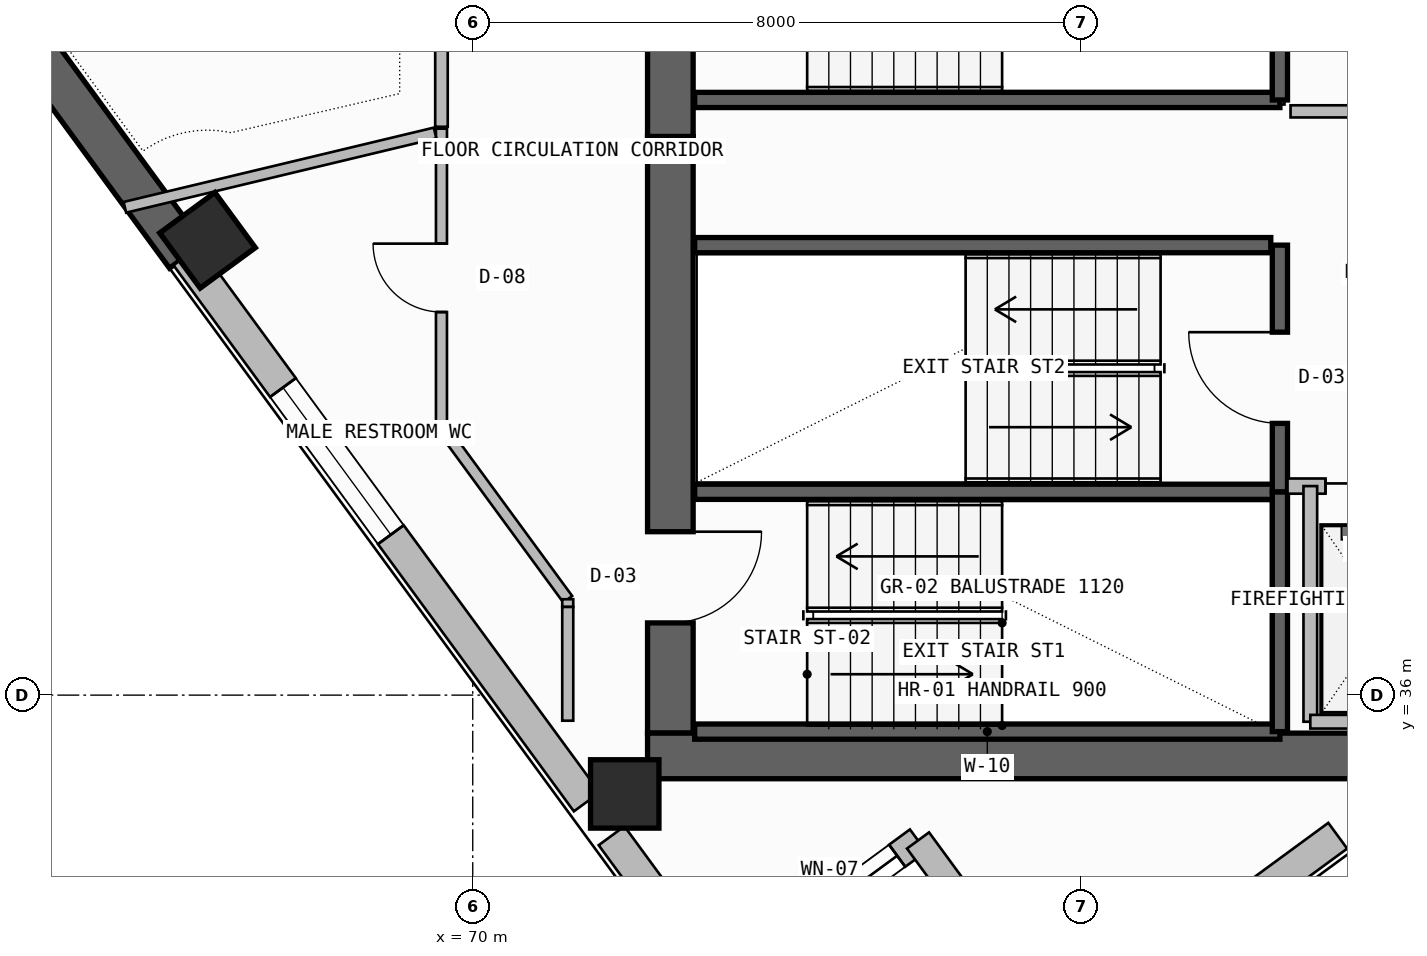
"""IFC4 building model, lengths in metres.
Left out: names, types, materials, properties, quantities, classifications, styles, units other than length and angle.
Written with IfcOpenShell. Run it as: python <this file> out.ifc"""

import sys

from ifc_helpers import new_model, si_unit, direction, frame, frame_2d, origin, origin_2d, place, context, subcontext, project, spatial, rectangle, extrude, element, fill, save


model = new_model("IFC4")
c1 = context("Model", 3, precision=1e-05, world=origin(), true_north=direction((0.0, 1.0)))
c2 = subcontext(c1, "Body", "Model", "MODEL_VIEW")
j1 = project(units=[si_unit("LENGTHUNIT", "METRE"), si_unit("PLANEANGLEUNIT", "RADIAN")], contexts=[c1])
p1 = place(None, origin())
s1 = spatial("IfcSite", under=j1, at=p1, CompositionType="ELEMENT")
p2 = place(p1, origin())
s2 = spatial("IfcBuilding", under=s1, at=p2, CompositionType="ELEMENT")
p3 = place(p2, frame((0.0, 0.0, 236.1)))
s3 = spatial("IfcBuildingStorey", under=s2, at=p3, CompositionType="ELEMENT", Elevation=236.1)
p4 = place(p3, frame((72.6, 35.5, -0.26), z_axis=(0.0, 0.0, 1.0), x_axis=(0.0, 1.0, 0.0)))
e1 = element("IfcWall", 1, at=p4, inside=s3, PredefinedType="SHEAR", context=c2, shape_type="SweptSolid", body=[
    extrude(rectangle(XDim=7.85, YDim=0.6, at=frame_2d((3.925, 0.0))), origin(), (0.0, 0.0, 1.0), 3.52),
])
p5 = place(p4, frame((1.45, 0.0, 0.26)))
e2 = element("IfcOpeningElement", 2, at=p5, cuts=e1, PredefinedType="OPENING", context=c2, shape_type="SweptSolid", body=[
    extrude(rectangle(XDim=1.2, YDim=2.2, at=frame_2d((0.6, 1.1))), frame((0.0, 0.31, 0.0), z_axis=(0.0, -1.0, 0.0), x_axis=(1.0, 0.0, 0.0)), (0.0, 0.0, 1.0), 0.62),
])
p6 = place(p3, frame((72.3, 35.2, -0.26), z_axis=(0.0, 0.0, 1.0), x_axis=(1.0, 0.0, 0.0)))
e3 = element("IfcWall", 3, at=p6, inside=s3, PredefinedType="SHEAR", context=c2, shape_type="SweptSolid", body=[
    extrude(rectangle(XDim=13.3, YDim=0.6, at=frame_2d((6.65, 0.0))), origin(), (0.0, 0.0, 1.0), 3.52),
])
p7 = place(p3, frame((72.6, 43.35, -0.26), z_axis=(0.0, 0.0, 1.0), x_axis=(0.0, 1.0, 0.0)))
e4 = element("IfcWall", 4, at=p7, inside=s3, PredefinedType="SHEAR", context=c2, shape_type="SweptSolid", body=[
    extrude(rectangle(XDim=12.7, YDim=0.6, at=frame_2d((6.35, 0.0))), origin(), (0.0, 0.0, 1.0), 3.52),
])
p8 = place(p7, frame((1.35, 0.0, 0.26)))
e5 = element("IfcOpeningElement", 5, at=p8, cuts=e4, PredefinedType="OPENING", context=c2, shape_type="SweptSolid", body=[
    extrude(rectangle(XDim=1.2, YDim=2.2, at=frame_2d((0.6, 1.1))), frame((0.0, 0.31, 0.0), z_axis=(0.0, -1.0, 0.0), x_axis=(1.0, 0.0, 0.0)), (0.0, 0.0, 1.0), 0.62),
])
for number, where, z_axis, x_axis in (
    (6, (72.0, 34.7, 0.0), (0.0, 0.0, 1.0), (1.0, 0.0, 0.0)),
    (7, (66.51, 41.983, 0.0), (0.0, 0.0, 1.0), (-0.591, 0.806, 0.0)),
):
    element("IfcColumn", number, at=place(p3, frame(where, z_axis=z_axis, x_axis=x_axis)), inside=s3, PredefinedType="COLUMN", context=c2, shape_type="SweptSolid", body=[
        extrude(rectangle(XDim=0.9, YDim=0.9, at=origin_2d()), origin(), (0.0, 0.0, 1.0), 3.52),
    ])
p9 = place(p3, frame((77.76, 31.495, 0.0), z_axis=(0.0, 0.0, 1.0), x_axis=(0.806458583304, 0.591290582891, 0.0)))
e8 = element("IfcWall", 8, at=p9, inside=s3, PredefinedType="SOLIDWALL", context=c2, shape_type="SweptSolid", body=[
    extrude(rectangle(XDim=4.49, YDim=0.42, at=frame_2d((2.245, 0.0))), origin(), (0.0, 0.0, 1.0), 3.26),
])
p10 = place(p3, frame((55.475, 56.45, -0.26), z_axis=(0.0, 0.0, 1.0), x_axis=(0.591309555876, -0.806444672082, 0.0)))
e9 = element("IfcWall", 9, at=p10, inside=s3, PredefinedType="SHEAR", context=c2, shape_type="SweptSolid", body=[
    extrude(rectangle(XDim=18.192, YDim=0.55, at=frame_2d((9.096, 0.0))), origin(), (0.0, 0.0, 1.0), 3.52),
])
p11 = place(p3, frame((66.232, 41.779, 0.0), z_axis=(0.0, 0.0, 1.0), x_axis=(0.591309008949, -0.806445073105, 0.0)))
e10 = element("IfcWall", 10, at=p11, inside=s3, PredefinedType="SOLIDWALL", context=c2, shape_type="SweptSolid", body=[
    extrude(rectangle(XDim=8.908, YDim=0.42, at=frame_2d((4.454, 0.0))), origin(), (0.0, 0.0, 1.0), 2.645),
])
p12 = place(p11, frame((2.149, 0.0, 1.1)))
e11 = element("IfcOpeningElement", 11, at=p12, cuts=e10, PredefinedType="OPENING", context=c2, shape_type="SweptSolid", body=[
    extrude(rectangle(XDim=2.4, YDim=1.2, at=frame_2d((1.2, 0.6))), frame((0.0, 0.22, 0.0), z_axis=(0.0, -1.0, 0.0), x_axis=(1.0, 0.0, 0.0)), (0.0, 0.0, 1.0), 0.44),
])
p13 = place(p3, frame((71.826, 34.15, 0.0), z_axis=(0.0, 0.0, 1.0), x_axis=(0.591315835946, -0.806440067308, 0.0)))
e12 = element("IfcWall", 12, at=p13, inside=s3, PredefinedType="SOLIDWALL", context=c2, shape_type="SweptSolid", body=[
    extrude(rectangle(XDim=2.434, YDim=0.42, at=frame_2d((1.217, 0.0))), origin(), (0.0, 0.0, 1.0), 3.26),
])
p14 = place(p3, frame((73.044, 32.024, 0.0), z_axis=(0.0, 0.0, 1.0), x_axis=(0.806433906667, 0.591324237774, 0.0)))
e13 = element("IfcWall", 13, at=p14, inside=s3, PredefinedType="SOLIDWALL", context=c2, shape_type="SweptSolid", body=[
    extrude(rectangle(XDim=3.49, YDim=0.36, at=frame_2d((1.745, 0.0))), origin(), (0.0, 0.0, 1.0), 3.26),
])
p15 = place(p14, frame((0.95, 0.0, 0.45)))
e14 = element("IfcOpeningElement", 14, at=p15, cuts=e13, PredefinedType="OPENING", context=c2, shape_type="SweptSolid", body=[
    extrude(rectangle(XDim=2.2, YDim=2.4, at=frame_2d((1.1, 1.2))), frame((0.0, 0.19, 0.0), z_axis=(0.0, -1.0, 0.0), x_axis=(1.0, 0.0, 0.0)), (0.0, 0.0, 1.0), 0.38),
])
p16 = place(p3, frame((75.859, 34.088, 0.0), z_axis=(0.0, 0.0, 1.0), x_axis=(0.591336371625, -0.806425009281, 0.0)))
e15 = element("IfcWall", 15, at=p16, inside=s3, PredefinedType="SOLIDWALL", context=c2, shape_type="SweptSolid", body=[
    extrude(rectangle(XDim=3.49, YDim=0.36, at=frame_2d((1.745, 0.0))), origin(), (0.0, 0.0, 1.0), 3.26),
])
for number, where, z_axis, x_axis in (
    (16, (72.92, 35.52, -0.26), (0.0, 0.0, 1.0), (1.0, 0.0, 0.0)),
    (17, (72.92, 38.675, -0.26), (0.0, 0.0, 1.0), (1.0, 0.0, 0.0)),
):
    element("IfcWall", number, at=place(p3, frame(where, z_axis=z_axis, x_axis=x_axis)), inside=s3, PredefinedType="SOLIDWALL", context=c2, shape_type="SweptSolid", body=[
        extrude(rectangle(XDim=7.7, YDim=0.2, at=frame_2d((3.85, 0.0))), origin(), (0.0, 0.0, 1.0), 3.52),
    ])
p17 = place(p3, frame((80.62, 35.52, -0.26), z_axis=(0.0, 0.0, 1.0), x_axis=(0.0, 1.0, 0.0)))
e18 = element("IfcWall", 18, at=p17, inside=s3, PredefinedType="SOLIDWALL", context=c2, shape_type="SweptSolid", body=[
    extrude(rectangle(XDim=3.155, YDim=0.2, at=frame_2d((1.578, 0.0))), origin(), (0.0, 0.0, 1.0), 3.52),
])
p18 = place(p3, frame((80.62, 38.675, -0.26), z_axis=(0.0, 0.0, 1.0), x_axis=(0.0, 1.0, 0.0)))
e19 = element("IfcWall", 19, at=p18, inside=s3, PredefinedType="SOLIDWALL", context=c2, shape_type="SweptSolid", body=[
    extrude(rectangle(XDim=3.245, YDim=0.2, at=frame_2d((1.623, 0.0))), origin(), (0.0, 0.0, 1.0), 3.52),
])
p19 = place(p18, frame((0.9, 0.0, 0.26)))
e20 = element("IfcOpeningElement", 20, at=p19, cuts=e19, PredefinedType="OPENING", context=c2, shape_type="SweptSolid", body=[
    extrude(rectangle(XDim=1.2, YDim=2.2, at=frame_2d((0.6, 1.1))), frame((0.0, 0.11, 0.0), z_axis=(0.0, -1.0, 0.0), x_axis=(1.0, 0.0, 0.0)), (0.0, 0.0, 1.0), 0.22),
])
p20 = place(p3, frame((80.72, 38.75, 0.0), z_axis=(0.0, 0.0, 1.0), x_axis=(1.0, 0.0, 0.0)))
e21 = element("IfcWall", 21, at=p20, inside=s3, PredefinedType="SOLIDWALL", context=c2, shape_type="SweptSolid", body=[
    extrude(rectangle(XDim=4.26, YDim=0.2, at=frame_2d((2.13, 0.0))), origin(), (0.0, 0.0, 1.0), 3.26),
])
p21 = place(p20, frame((0.5, 0.0, 0.0)))
e22 = element("IfcOpeningElement", 22, at=p21, cuts=e21, PredefinedType="OPENING", context=c2, shape_type="SweptSolid", body=[
    extrude(rectangle(XDim=1.3, YDim=2.3, at=frame_2d((0.65, 1.15))), frame((0.0, 0.11, 0.0), z_axis=(0.0, -1.0, 0.0), x_axis=(1.0, 0.0, 0.0)), (0.0, 0.0, 1.0), 0.22),
])
p22 = place(p20, frame((2.45, 0.0, 0.0)))
e23 = element("IfcOpeningElement", 23, at=p22, cuts=e21, PredefinedType="OPENING", context=c2, shape_type="SweptSolid", body=[
    extrude(rectangle(XDim=1.3, YDim=2.3, at=frame_2d((0.65, 1.15))), frame((0.0, 0.11, 0.0), z_axis=(0.0, -1.0, 0.0), x_axis=(1.0, 0.0, 0.0)), (0.0, 0.0, 1.0), 0.22),
])
p23 = place(p3, frame((81.02, 35.65, 0.0), z_axis=(0.0, 0.0, 1.0), x_axis=(0.0, 1.0, 0.0)))
e24 = element("IfcWall", 24, at=p23, inside=s3, PredefinedType="SOLIDWALL", context=c2, shape_type="SweptSolid", body=[
    extrude(rectangle(XDim=3.1, YDim=0.18, at=frame_2d((1.55, 0.0))), origin(), (0.0, 0.0, 1.0), 3.26),
])
p24 = place(p3, frame((81.02, 35.65, 0.0), z_axis=(0.0, 0.0, 1.0), x_axis=(1.0, 0.0, 0.0)))
e25 = element("IfcWall", 25, at=p24, inside=s3, PredefinedType="SOLIDWALL", context=c2, shape_type="SweptSolid", body=[
    extrude(rectangle(XDim=3.93, YDim=0.18, at=frame_2d((1.965, 0.0))), origin(), (0.0, 0.0, 1.0), 3.26),
])
p25 = place(p3, frame((72.92, 41.92, -0.26), z_axis=(0.0, 0.0, 1.0), x_axis=(1.0, 0.0, 0.0)))
e26 = element("IfcWall", 26, at=p25, inside=s3, PredefinedType="SOLIDWALL", context=c2, shape_type="SweptSolid", body=[
    extrude(rectangle(XDim=7.58, YDim=0.2, at=frame_2d((3.79, 0.0))), origin(), (0.0, 0.0, 1.0), 3.52),
])
p26 = place(p3, frame((72.92, 43.83, -0.26), z_axis=(0.0, 0.0, 1.0), x_axis=(1.0, 0.0, 0.0)))
e27 = element("IfcWall", 27, at=p26, inside=s3, PredefinedType="SOLIDWALL", context=c2, shape_type="SweptSolid", body=[
    extrude(rectangle(XDim=7.7, YDim=0.2, at=frame_2d((3.85, 0.0))), origin(), (0.0, 0.0, 1.0), 3.52),
])
p27 = place(p3, frame((80.62, 43.83, -0.26), z_axis=(0.0, 0.0, 1.0), x_axis=(0.0, 1.0, 0.0)))
e28 = element("IfcWall", 28, at=p27, inside=s3, PredefinedType="SOLIDWALL", context=c2, shape_type="SweptSolid", body=[
    extrude(rectangle(XDim=3.24, YDim=0.2, at=frame_2d((1.62, 0.0))), origin(), (0.0, 0.0, 1.0), 3.52),
])
p28 = place(p3, frame((80.76, 43.68, 0.0), z_axis=(0.0, 0.0, 1.0), x_axis=(1.0, 0.0, 0.0)))
e29 = element("IfcWall", 29, at=p28, inside=s3, PredefinedType="PLUMBINGWALL", context=c2, shape_type="SweptSolid", body=[
    extrude(rectangle(XDim=4.19, YDim=0.16, at=frame_2d((2.095, 0.0))), origin(), (0.0, 0.0, 1.0), 3.26),
])
p29 = place(p3, frame((69.589, 43.453, 0.0), z_axis=(0.0, 0.0, 1.0), x_axis=(0.0, -1.0, 0.0)))
e30 = element("IfcWall", 30, at=p29, inside=s3, PredefinedType="PARTITIONING", context=c2, shape_type="SweptSolid", body=[
    extrude(rectangle(XDim=3.925, YDim=0.145, at=frame_2d((1.963, 0.0))), origin(), (0.0, 0.0, 1.0), 3.26),
])
p30 = place(p29, frame((1.513, 0.0, 0.0)))
e31 = element("IfcOpeningElement", 31, at=p30, cuts=e30, PredefinedType="OPENING", context=c2, shape_type="SweptSolid", body=[
    extrude(rectangle(XDim=0.9, YDim=2.1, at=frame_2d((0.45, 1.05))), frame((0.0, 0.083, 0.0), z_axis=(0.0, -1.0, 0.0), x_axis=(1.0, 0.0, 0.0)), (0.0, 0.0, 1.0), 0.165),
])
p31 = place(p3, frame((69.589, 39.527, 0.0), z_axis=(0.0, 0.0, 1.0), x_axis=(0.591303389729, -0.806449193251, 0.0)))
e32 = element("IfcWall", 32, at=p31, inside=s3, PredefinedType="PARTITIONING", context=c2, shape_type="SweptSolid", body=[
    extrude(rectangle(XDim=2.81, YDim=0.145, at=frame_2d((1.405, 0.0))), origin(), (0.0, 0.0, 1.0), 3.26),
])
p32 = place(p3, frame((71.25, 37.261, 0.0), z_axis=(0.0, 0.0, 1.0), x_axis=(0.0, -1.0, 0.0)))
e33 = element("IfcWall", 33, at=p32, inside=s3, PredefinedType="PARTITIONING", context=c2, shape_type="SweptSolid", body=[
    extrude(rectangle(XDim=0.102, YDim=0.145, at=frame_2d((0.051, 0.0))), origin(), (0.0, 0.0, 1.0), 3.26),
])
p33 = place(p3, frame((65.423, 42.418, 0.0), z_axis=(0.0, 0.0, 1.0), x_axis=(0.972477530302, 0.232996680358, 0.0)))
e34 = element("IfcWall", 34, at=p33, inside=s3, PredefinedType="PARTITIONING", context=c2, shape_type="SweptSolid", body=[
    extrude(rectangle(XDim=4.197, YDim=0.145, at=frame_2d((2.098, 0.0))), origin(), (0.0, 0.0, 1.0), 2.645),
])
p34 = place(p3, frame((69.589, 51.066, 0.0), z_axis=(0.0, 0.0, 1.0), x_axis=(0.0, -1.0, 0.0)))
e35 = element("IfcWall", 35, at=p34, inside=s3, PredefinedType="PARTITIONING", context=c2, shape_type="SweptSolid", body=[
    extrude(rectangle(XDim=7.589, YDim=0.165, at=frame_2d((3.794, 0.0))), origin(), (0.0, 0.0, 1.0), 2.745),
])
p35 = place(p34, frame((3.294, 0.0, 0.0)))
e36 = element("IfcOpeningElement", 36, at=p35, cuts=e35, PredefinedType="OPENING", context=c2, shape_type="SweptSolid", body=[
    extrude(rectangle(XDim=1.0, YDim=2.2, at=frame_2d((0.5, 1.1))), frame((0.0, 0.093, 0.0), z_axis=(0.0, -1.0, 0.0), x_axis=(1.0, 0.0, 0.0)), (0.0, 0.0, 1.0), 0.185),
])
p36 = place(p3, frame((71.25, 37.16, 0.0), z_axis=(0.0, 0.0, 1.0), x_axis=(0.0, -1.0, 0.0)))
e37 = element("IfcWall", 37, at=p36, inside=s3, PredefinedType="PARTITIONING", context=c2, shape_type="SweptSolid", body=[
    extrude(rectangle(XDim=1.497, YDim=0.145, at=frame_2d((0.748, 0.0))), origin(), (0.0, 0.0, 1.0), 3.26),
])
p37 = place(p12, origin())
e38 = element("IfcWindow", 38, at=p37, inside=s3, PartitioningType="SINGLE_PANEL", PredefinedType="WINDOW", context=c2, shape_type="SweptSolid", body=[
    extrude(rectangle(XDim=2.4, YDim=1.2, at=frame_2d((1.2, 0.6))), frame((0.0, 0.03, 0.0), z_axis=(0.0, -1.0, 0.0), x_axis=(1.0, 0.0, 0.0)), (0.0, 0.0, 1.0), 0.06),
])
fill(e11, e38)
p38 = place(p15, origin())
e39 = element("IfcWindow", 39, at=p38, inside=s3, PartitioningType="SINGLE_PANEL", PredefinedType="WINDOW", context=c2, shape_type="SweptSolid", body=[
    extrude(rectangle(XDim=2.2, YDim=2.4, at=frame_2d((1.1, 1.2))), frame((0.0, 0.03, 0.0), z_axis=(0.0, -1.0, 0.0), x_axis=(1.0, 0.0, 0.0)), (0.0, 0.0, 1.0), 0.06),
])
fill(e14, e39)
p39 = place(p5, frame((1.2, 0.0, 0.0), z_axis=(0.0, 0.0, 1.0), x_axis=(-1.0, 0.0, 0.0)))
e40 = element("IfcDoor", 40, at=p39, inside=s3, OperationType="SINGLE_SWING_LEFT", PredefinedType="USERDEFINED", context=c2, shape_type="SweptSolid", body=[
    extrude(rectangle(XDim=1.2, YDim=2.2, at=frame_2d((0.6, 1.1))), frame((0.0, 0.025, 0.0), z_axis=(0.0, -1.0, 0.0), x_axis=(1.0, 0.0, 0.0)), (0.0, 0.0, 1.0), 0.05),
])
fill(e2, e40)
p40 = place(p19, origin())
e41 = element("IfcDoor", 41, at=p40, inside=s3, OperationType="SINGLE_SWING_RIGHT", PredefinedType="USERDEFINED", context=c2, shape_type="SweptSolid", body=[
    extrude(rectangle(XDim=1.2, YDim=2.2, at=frame_2d((0.6, 1.1))), frame((0.0, 0.025, 0.0), z_axis=(0.0, -1.0, 0.0), x_axis=(1.0, 0.0, 0.0)), (0.0, 0.0, 1.0), 0.05),
])
fill(e20, e41)
p41 = place(p21, origin())
e42 = element("IfcDoor", 42, at=p41, inside=s3, OperationType="DOUBLE_DOOR_SLIDING", PredefinedType="DOOR", context=c2, shape_type="SweptSolid", body=[
    extrude(rectangle(XDim=1.3, YDim=2.3, at=frame_2d((0.65, 1.15))), frame((0.0, 0.025, 0.0), z_axis=(0.0, -1.0, 0.0), x_axis=(1.0, 0.0, 0.0)), (0.0, 0.0, 1.0), 0.05),
])
fill(e22, e42)
p42 = place(p30, frame((0.9, 0.0, 0.0), z_axis=(0.0, 0.0, 1.0), x_axis=(-1.0, 0.0, 0.0)))
e43 = element("IfcDoor", 43, at=p42, inside=s3, OperationType="SINGLE_SWING_RIGHT", PredefinedType="DOOR", context=c2, shape_type="SweptSolid", body=[
    extrude(rectangle(XDim=0.9, YDim=2.1, at=frame_2d((0.45, 1.05))), frame((0.0, 0.025, 0.0), z_axis=(0.0, -1.0, 0.0), x_axis=(1.0, 0.0, 0.0)), (0.0, 0.0, 1.0), 0.05),
])
fill(e31, e43)
save(model, sys.argv[1])
